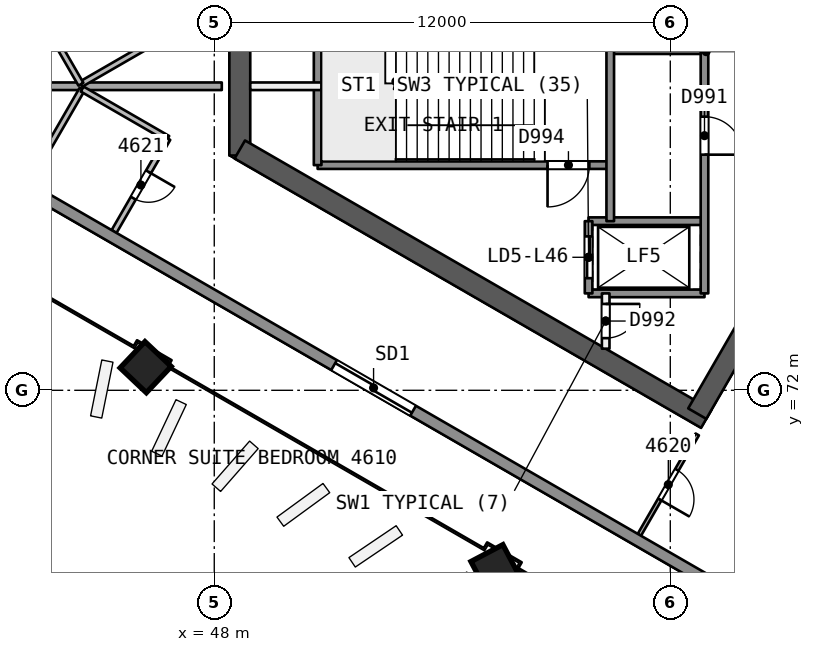
"""IFC4 building model, lengths in metres.
Left out: names, types, materials, properties, quantities, classifications, styles, units other than length and angle.
Written with IfcOpenShell. Run it as: python <this file> out.ifc"""

import sys

from ifc_helpers import new_model, si_unit, direction, frame, frame_2d, origin, origin_2d, place, context, subcontext, project, spatial, rectangle, extrude, element, fill, save


model = new_model("IFC4")
c1 = context("Model", 3, precision=1e-05, world=origin(), true_north=direction((0.0, 1.0)))
c2 = subcontext(c1, "Body", "Model", "MODEL_VIEW")
j1 = project(units=[si_unit("LENGTHUNIT", "METRE"), si_unit("PLANEANGLEUNIT", "RADIAN")], contexts=[c1])
p1 = place(None, origin())
s1 = spatial("IfcSite", under=j1, at=p1, CompositionType="ELEMENT")
p2 = place(p1, origin())
s2 = spatial("IfcBuilding", under=s1, at=p2, CompositionType="ELEMENT")
p3 = place(p2, frame((0.0, 0.0, 189.6)))
s3 = spatial("IfcBuildingStorey", under=s2, at=p3, CompositionType="ELEMENT", Elevation=189.6)
p4 = place(p3, frame((65.682, 80.0, 0.0), z_axis=(0.0, 0.0, 1.0), x_axis=(-0.500000202252, 0.866025287014, 0.0)))
e1 = element("IfcWall", 1, at=p4, inside=s3, PredefinedType="SHEAR", context=c2, shape_type="SweptSolid", body=[
    extrude(rectangle(XDim=10.221, YDim=0.55, at=frame_2d((5.111, 0.0))), origin(), (0.0, 0.0, 1.0), 3.7),
])
p5 = place(p4, frame((0.791, 0.0, 0.0)))
e2 = element("IfcOpeningElement", 2, at=p5, cuts=e1, PredefinedType="OPENING", context=c2, shape_type="SweptSolid", body=[
    extrude(rectangle(XDim=1.2, YDim=2.1, at=frame_2d((0.6, 1.05))), frame((0.0, 0.286, 0.0), z_axis=(0.0, -1.0, 0.0), x_axis=(1.0, 0.0, 0.0)), (0.0, 0.0, 1.0), 0.571),
])
p6 = place(p3, frame((48.672, 81.664, 0.0), z_axis=(0.0, 0.0, 1.0), x_axis=(0.0, -1.0, 0.0)))
e3 = element("IfcWall", 3, at=p6, inside=s3, PredefinedType="SHEAR", context=c2, shape_type="SweptSolid", body=[
    extrude(rectangle(XDim=3.487, YDim=0.55, at=frame_2d((1.743, 0.0))), origin(), (0.0, 0.0, 1.0), 3.7),
])
p7 = place(p3, frame((48.672, 78.336, 0.0), z_axis=(0.0, 0.0, 1.0), x_axis=(0.866023530946, -0.500003243837, 0.0)))
e4 = element("IfcWall", 4, at=p7, inside=s3, PredefinedType="SHEAR", context=c2, shape_type="SweptSolid", body=[
    extrude(rectangle(XDim=14.175, YDim=0.55, at=frame_2d((7.087, 0.0))), origin(), (0.0, 0.0, 1.0), 3.7),
])
p8 = place(p3, frame((60.709, 71.386, 0.0), z_axis=(0.0, 0.0, 1.0), x_axis=(0.500015938302, 0.866016201606, 0.0)))
e5 = element("IfcWall", 5, at=p8, inside=s3, PredefinedType="SHEAR", context=c2, shape_type="SweptSolid", body=[
    extrude(rectangle(XDim=10.105, YDim=0.55, at=frame_2d((5.053, 0.0))), origin(), (0.0, 0.0, 1.0), 3.7),
])
p9 = place(p8, frame((7.955, 0.0, 0.0)))
e6 = element("IfcOpeningElement", 6, at=p9, cuts=e5, PredefinedType="OPENING", context=c2, shape_type="SweptSolid", body=[
    extrude(rectangle(XDim=1.2, YDim=2.1, at=frame_2d((0.6, 1.05))), frame((0.0, 0.286, 0.0), z_axis=(0.0, -1.0, 0.0), x_axis=(1.0, 0.0, 0.0)), (0.0, 0.0, 1.0), 0.571),
])
p10 = place(p3, frame((46.161, 72.601, 0.0), z_axis=(0.02855911485, 0.006793507689, 0.999569019734), x_axis=(-0.865318766308, 0.500768301983, 0.021319953197)))
e7 = element("IfcColumn", 7, at=p10, inside=s3, PredefinedType="COLUMN", context=c2, shape_type="SweptSolid", body=[
    extrude(rectangle(XDim=0.95, YDim=0.95, at=origin_2d()), origin(), (0.0, 0.0, 1.0), 3.702),
])
p11 = place(p3, frame((55.373, 67.281, 0.0), z_axis=(0.019328516974, 0.012138044789, 0.999739504221), x_axis=(-0.865690909737, 0.500465383244, 0.010660627254)))
e8 = element("IfcColumn", 8, at=p11, inside=s3, PredefinedType="COLUMN", context=c2, shape_type="SweptSolid", body=[
    extrude(rectangle(XDim=0.95, YDim=0.95, at=origin_2d()), origin(), (0.0, 0.0, 1.0), 3.701),
])
p12 = place(p3, frame((46.743, 81.354, 0.0), z_axis=(0.0, 0.0, 1.0), x_axis=(-0.866021400173, -0.500006934395, 0.0)))
e9 = element("IfcWall", 9, at=p12, inside=s3, PredefinedType="PARTITIONING", context=c2, shape_type="SweptSolid", body=[
    extrude(rectangle(XDim=2.6, YDim=0.15, at=frame_2d((1.3, 0.0))), origin(), (0.0, 0.0, 1.0), 3.25),
])
p13 = place(p3, frame((44.491, 80.054, 0.0), z_axis=(0.0, 0.0, 1.0), x_axis=(-0.500043204492, 0.866000458222, 0.0)))
e10 = element("IfcWall", 10, at=p13, inside=s3, PredefinedType="PARTITIONING", context=c2, shape_type="SweptSolid", body=[
    extrude(rectangle(XDim=2.482, YDim=0.15, at=frame_2d((1.241, 0.0))), origin(), (0.0, 0.0, 1.0), 3.25),
])
p14 = place(p3, frame((43.25, 80.0, 0.0), z_axis=(0.0, 0.0, 1.0), x_axis=(1.0, 0.0, 0.0)))
e11 = element("IfcWall", 11, at=p14, inside=s3, PredefinedType="PARTITIONING", context=c2, shape_type="SweptSolid", body=[
    extrude(rectangle(XDim=4.948, YDim=0.2, at=frame_2d((2.474, 0.0))), origin(), (0.0, 0.0, 1.0), 3.25),
])
p15 = place(p3, frame((60.71, 70.838, 0.0), z_axis=(0.0, 0.0, 1.0), x_axis=(-0.499978833458, -0.866037623948, 0.0)))
e12 = element("IfcWall", 12, at=p15, inside=s3, PredefinedType="PARTITIONING", context=c2, shape_type="SweptSolid", body=[
    extrude(rectangle(XDim=3.05, YDim=0.1, at=frame_2d((1.525, 0.0))), origin(), (0.0, 0.0, 1.0), 3.25),
])
p16 = place(p15, frame((1.075, 0.0, 0.0)))
e13 = element("IfcOpeningElement", 13, at=p16, cuts=e12, PredefinedType="OPENING", context=c2, shape_type="SweptSolid", body=[
    extrude(rectangle(XDim=0.9, YDim=2.1, at=frame_2d((0.45, 1.05))), frame((0.0, 0.061, 0.0), z_axis=(0.0, -1.0, 0.0), x_axis=(1.0, 0.0, 0.0)), (0.0, 0.0, 1.0), 0.121),
])
p17 = place(p3, frame((43.25, 77.718, 0.0), z_axis=(0.0, 0.0, 1.0), x_axis=(0.499990435942, 0.866030925526, 0.0)))
e14 = element("IfcWall", 14, at=p17, inside=s3, PredefinedType="PARTITIONING", context=c2, shape_type="SweptSolid", body=[
    extrude(rectangle(XDim=2.55, YDim=0.15, at=frame_2d((1.275, 0.0))), origin(), (0.0, 0.0, 1.0), 3.25),
])
p18 = place(p3, frame((44.525, 79.926, 0.0), z_axis=(0.0, 0.0, 1.0), x_axis=(0.866021400173, -0.500006934395, 0.0)))
e15 = element("IfcWall", 15, at=p18, inside=s3, PredefinedType="PARTITIONING", context=c2, shape_type="SweptSolid", body=[
    extrude(rectangle(XDim=2.6, YDim=0.15, at=frame_2d((1.3, 0.0))), origin(), (0.0, 0.0, 1.0), 3.25),
])
p19 = place(p3, frame((46.777, 78.626, 0.0), z_axis=(0.0, 0.0, 1.0), x_axis=(-0.499984077514, -0.866034596441, 0.0)))
e16 = element("IfcWall", 16, at=p19, inside=s3, PredefinedType="PARTITIONING", context=c2, shape_type="SweptSolid", body=[
    extrude(rectangle(XDim=2.827, YDim=0.15, at=frame_2d((1.414, 0.0))), origin(), (0.0, 0.0, 1.0), 3.25),
])
p20 = place(p19, frame((1.014, 0.0, 0.0)))
e17 = element("IfcOpeningElement", 17, at=p20, cuts=e16, PredefinedType="OPENING", context=c2, shape_type="SweptSolid", body=[
    extrude(rectangle(XDim=0.8, YDim=2.1, at=frame_2d((0.4, 1.05))), frame((0.0, 0.085, 0.0), z_axis=(0.0, -1.0, 0.0), x_axis=(1.0, 0.0, 0.0)), (0.0, 0.0, 1.0), 0.171),
])
p21 = place(p3, frame((88.621, 51.031, 0.0), z_axis=(0.0, 0.0, 1.0), x_axis=(-0.866025007541, 0.500000686313, 0.0)))
e18 = element("IfcWall", 18, at=p21, inside=s3, PredefinedType="SOLIDWALL", context=c2, shape_type="SweptSolid", body=[
    extrude(rectangle(XDim=52.562, YDim=0.3, at=frame_2d((26.281, 0.0))), origin(), (0.0, 0.0, 1.0), 3.25),
])
p22 = place(p21, frame((29.367, 0.0, 0.0)))
e19 = element("IfcOpeningElement", 19, at=p22, cuts=e18, PredefinedType="OPENING", context=c2, shape_type="SweptSolid", body=[
    extrude(rectangle(XDim=2.4, YDim=2.4, at=frame_2d((1.2, 1.2))), frame((0.0, 0.161, 0.0), z_axis=(0.0, -1.0, 0.0), x_axis=(1.0, 0.0, 0.0)), (0.0, 0.0, 1.0), 0.321),
])
p23 = place(p21, frame((40.864, 0.0, 0.0)))
e20 = element("IfcOpeningElement", 20, at=p23, cuts=e18, PredefinedType="OPENING", context=c2, shape_type="SweptSolid", body=[
    extrude(rectangle(XDim=2.4, YDim=2.4, at=frame_2d((1.2, 1.2))), frame((0.0, 0.161, 0.0), z_axis=(0.0, -1.0, 0.0), x_axis=(1.0, 0.0, 0.0)), (0.0, 0.0, 1.0), 0.321),
])
p24 = place(p21, frame((19.625, 0.0, 0.0)))
e21 = element("IfcOpeningElement", 21, at=p24, cuts=e18, PredefinedType="OPENING", context=c2, shape_type="SweptSolid", body=[
    extrude(rectangle(XDim=2.4, YDim=2.4, at=frame_2d((1.2, 1.2))), frame((0.0, 0.161, 0.0), z_axis=(0.0, -1.0, 0.0), x_axis=(1.0, 0.0, 0.0)), (0.0, 0.0, 1.0), 0.321),
])
p25 = place(p21, frame((9.277, 0.0, 0.0)))
e22 = element("IfcOpeningElement", 22, at=p25, cuts=e18, PredefinedType="OPENING", context=c2, shape_type="SweptSolid", body=[
    extrude(rectangle(XDim=2.4, YDim=2.4, at=frame_2d((1.2, 1.2))), frame((0.0, 0.161, 0.0), z_axis=(0.0, -1.0, 0.0), x_axis=(1.0, 0.0, 0.0)), (0.0, 0.0, 1.0), 0.321),
])
p26 = place(p21, frame((24.212, 0.0, 0.9)))
e23 = element("IfcOpeningElement", 23, at=p26, cuts=e18, PredefinedType="OPENING", context=c2, shape_type="SweptSolid", body=[
    extrude(rectangle(XDim=1.8, YDim=1.5, at=frame_2d((0.9, 0.75))), frame((0.0, 0.161, 0.0), z_axis=(0.0, -1.0, 0.0), x_axis=(1.0, 0.0, 0.0)), (0.0, 0.0, 1.0), 0.321),
])
p27 = place(p3, frame((60.9, 80.95, 0.0), z_axis=(0.0, 0.0, 1.0), x_axis=(-1.0, 0.0, 0.0)))
e24 = element("IfcWall", 24, at=p27, inside=s3, PredefinedType="SOLIDWALL", context=c2, shape_type="SweptSolid", body=[
    extrude(rectangle(XDim=2.48, YDim=0.2, at=frame_2d((1.24, 0.0))), origin(), (0.0, 0.0, 1.0), 3.25),
])
p28 = place(p3, frame((50.82, 80.0, 0.0), z_axis=(0.0, 0.0, 1.0), x_axis=(-1.0, 0.0, 0.0)))
e25 = element("IfcWall", 25, at=p28, inside=s3, PredefinedType="PARTITIONING", context=c2, shape_type="SweptSolid", body=[
    extrude(rectangle(XDim=1.873, YDim=0.2, at=frame_2d((0.937, 0.0))), origin(), (0.0, 0.0, 1.0), 3.25),
])
p29 = place(p3, frame((58.42, 77.925, 0.0), z_axis=(0.0, 0.0, 1.0), x_axis=(-1.0, 0.0, 0.0)))
e26 = element("IfcWall", 26, at=p29, inside=s3, PredefinedType="SOLIDWALL", context=c2, shape_type="SweptSolid", body=[
    extrude(rectangle(XDim=7.7, YDim=0.2, at=frame_2d((3.85, 0.0))), origin(), (0.0, 0.0, 1.0), 3.25),
])
p30 = place(p29, frame((0.55, 0.0, 0.0)))
e27 = element("IfcOpeningElement", 27, at=p30, cuts=e26, PredefinedType="OPENING", context=c2, shape_type="SweptSolid", body=[
    extrude(rectangle(XDim=1.1, YDim=2.1, at=frame_2d((0.55, 1.05))), frame((0.0, 0.11, 0.0), z_axis=(0.0, -1.0, 0.0), x_axis=(1.0, 0.0, 0.0)), (0.0, 0.0, 1.0), 0.221),
])
for number, where, z_axis, x_axis in (
    (28, (60.9, 76.45, 0.0), (0.0, 0.0, 1.0), (-1.0, 0.0, 0.0)),
    (29, (60.9, 74.55, 0.0), (0.0, 0.0, 1.0), (-1.0, 0.0, 0.0)),
):
    element("IfcWall", number, at=place(p3, frame(where, z_axis=z_axis, x_axis=x_axis)), inside=s3, PredefinedType="SOLIDWALL", context=c2, shape_type="SweptSolid", body=[
        extrude(rectangle(XDim=3.05, YDim=0.2, at=frame_2d((1.525, 0.0))), origin(), (0.0, 0.0, 1.0), 3.25),
    ])
p31 = place(p3, frame((60.9, 85.45, 0.0), z_axis=(0.0, 0.0, 1.0), x_axis=(0.0, -1.0, 0.0)))
e30 = element("IfcWall", 30, at=p31, inside=s3, PredefinedType="SOLIDWALL", context=c2, shape_type="SweptSolid", body=[
    extrude(rectangle(XDim=10.9, YDim=0.2, at=frame_2d((5.45, 0.0))), origin(), (0.0, 0.0, 1.0), 3.25),
])
p32 = place(p31, frame((1.75, 0.0, 0.0)))
e31 = element("IfcOpeningElement", 31, at=p32, cuts=e30, PredefinedType="OPENING", context=c2, shape_type="SweptSolid", body=[
    extrude(rectangle(XDim=1.0, YDim=2.1, at=frame_2d((0.5, 1.05))), frame((0.0, 0.11, 0.0), z_axis=(0.0, -1.0, 0.0), x_axis=(1.0, 0.0, 0.0)), (0.0, 0.0, 1.0), 0.221),
])
p33 = place(p31, frame((6.25, 0.0, 0.0)))
e32 = element("IfcOpeningElement", 32, at=p33, cuts=e30, PredefinedType="OPENING", context=c2, shape_type="SweptSolid", body=[
    extrude(rectangle(XDim=1.0, YDim=2.1, at=frame_2d((0.5, 1.05))), frame((0.0, 0.11, 0.0), z_axis=(0.0, -1.0, 0.0), x_axis=(1.0, 0.0, 0.0)), (0.0, 0.0, 1.0), 0.221),
])
p34 = place(p3, frame((58.42, 86.974, 0.0), z_axis=(0.0, 0.0, 1.0), x_axis=(0.0, -1.0, 0.0)))
e33 = element("IfcWall", 33, at=p34, inside=s3, PredefinedType="SOLIDWALL", context=c2, shape_type="SweptSolid", body=[
    extrude(rectangle(XDim=10.524, YDim=0.2, at=frame_2d((5.262, 0.0))), origin(), (0.0, 0.0, 1.0), 3.25),
])
p35 = place(p34, frame((0.312, 0.0, 0.0)))
e34 = element("IfcOpeningElement", 34, at=p35, cuts=e33, PredefinedType="OPENING", context=c2, shape_type="SweptSolid", body=[
    extrude(rectangle(XDim=0.9, YDim=2.1, at=frame_2d((0.45, 1.05))), frame((0.0, 0.11, 0.0), z_axis=(0.0, -1.0, 0.0), x_axis=(1.0, 0.0, 0.0)), (0.0, 0.0, 1.0), 0.221),
])
p36 = place(p3, frame((58.3, 74.55, 0.0), z_axis=(0.0, 0.0, 1.0), x_axis=(0.0, -1.0, 0.0)))
e35 = element("IfcWall", 35, at=p36, inside=s3, PredefinedType="PARTITIONING", context=c2, shape_type="SweptSolid", body=[
    extrude(rectangle(XDim=1.455, YDim=0.2, at=frame_2d((0.728, 0.0))), origin(), (0.0, 0.0, 1.0), 3.25),
])
p37 = place(p36, frame((0.278, 0.0, 0.0)))
e36 = element("IfcOpeningElement", 36, at=p37, cuts=e35, PredefinedType="OPENING", context=c2, shape_type="SweptSolid", body=[
    extrude(rectangle(XDim=0.9, YDim=2.1, at=frame_2d((0.45, 1.05))), frame((0.0, 0.11, 0.0), z_axis=(0.0, -1.0, 0.0), x_axis=(1.0, 0.0, 0.0)), (0.0, 0.0, 1.0), 0.221),
])
p38 = place(p3, frame((57.85, 76.45, 0.0), z_axis=(0.0, 0.0, 1.0), x_axis=(0.0, -1.0, 0.0)))
e37 = element("IfcWall", 37, at=p38, inside=s3, PredefinedType="SOLIDWALL", context=c2, shape_type="SweptSolid", body=[
    extrude(rectangle(XDim=1.9, YDim=0.2, at=frame_2d((0.95, 0.0))), origin(), (0.0, 0.0, 1.0), 3.25),
])
p39 = place(p38, frame((0.4, 0.0, 0.0)))
e38 = element("IfcOpeningElement", 38, at=p39, cuts=e37, PredefinedType="OPENING", context=c2, shape_type="SweptSolid", body=[
    extrude(rectangle(XDim=1.1, YDim=2.1, at=frame_2d((0.55, 1.05))), frame((0.0, 0.11, 0.0), z_axis=(0.0, -1.0, 0.0), x_axis=(1.0, 0.0, 0.0)), (0.0, 0.0, 1.0), 0.221),
])
p40 = place(p3, frame((50.72, 82.075, 0.0), z_axis=(0.0, 0.0, 1.0), x_axis=(0.0, -1.0, 0.0)))
e39 = element("IfcWall", 39, at=p40, inside=s3, PredefinedType="SOLIDWALL", context=c2, shape_type="SweptSolid", body=[
    extrude(rectangle(XDim=4.15, YDim=0.2, at=frame_2d((2.075, 0.0))), origin(), (0.0, 0.0, 1.0), 3.25),
])
p41 = place(p16, origin())
e40 = element("IfcDoor", 40, at=p41, inside=s3, OperationType="SINGLE_SWING_RIGHT", PredefinedType="NOTDEFINED", context=c2, shape_type="SweptSolid", body=[
    extrude(rectangle(XDim=0.9, YDim=2.1, at=frame_2d((0.45, 1.05))), frame((0.0, 0.025, 0.0), z_axis=(0.0, -1.0, 0.0), x_axis=(1.0, 0.0, 0.0)), (0.0, 0.0, 1.0), 0.05),
])
fill(e13, e40)
p42 = place(p20, origin())
e41 = element("IfcDoor", 41, at=p42, inside=s3, OperationType="SINGLE_SWING_LEFT", PredefinedType="NOTDEFINED", context=c2, shape_type="SweptSolid", body=[
    extrude(rectangle(XDim=0.8, YDim=2.1, at=frame_2d((0.4, 1.05))), frame((0.0, 0.025, 0.0), z_axis=(0.0, -1.0, 0.0), x_axis=(1.0, 0.0, 0.0)), (0.0, 0.0, 1.0), 0.05),
])
fill(e17, e41)
p43 = place(p23, origin())
e42 = element("IfcDoor", 42, at=p43, inside=s3, OperationType="SLIDING_TO_RIGHT", PredefinedType="NOTDEFINED", context=c2, shape_type="SweptSolid", body=[
    extrude(rectangle(XDim=2.4, YDim=2.4, at=frame_2d((1.2, 1.2))), frame((0.0, 0.025, 0.0), z_axis=(0.0, -1.0, 0.0), x_axis=(1.0, 0.0, 0.0)), (0.0, 0.0, 1.0), 0.05),
])
fill(e20, e42)
p44 = place(p39, origin())
e43 = element("IfcDoor", 43, at=p44, inside=s3, OperationType="SLIDING_TO_RIGHT", PredefinedType="NOTDEFINED", context=c2, shape_type="SweptSolid", body=[
    extrude(rectangle(XDim=1.1, YDim=2.1, at=frame_2d((0.55, 1.05))), frame((0.0, 0.025, 0.0), z_axis=(0.0, -1.0, 0.0), x_axis=(1.0, 0.0, 0.0)), (0.0, 0.0, 1.0), 0.05),
])
fill(e38, e43)
p45 = place(p33, origin())
e44 = element("IfcDoor", 44, at=p45, inside=s3, OperationType="SINGLE_SWING_RIGHT", PredefinedType="NOTDEFINED", context=c2, shape_type="SweptSolid", body=[
    extrude(rectangle(XDim=1.0, YDim=2.1, at=frame_2d((0.5, 1.05))), frame((0.0, 0.025, 0.0), z_axis=(0.0, -1.0, 0.0), x_axis=(1.0, 0.0, 0.0)), (0.0, 0.0, 1.0), 0.05),
])
fill(e32, e44)
p46 = place(p37, origin())
e45 = element("IfcDoor", 45, at=p46, inside=s3, OperationType="SINGLE_SWING_LEFT", PredefinedType="NOTDEFINED", context=c2, shape_type="SweptSolid", body=[
    extrude(rectangle(XDim=0.9, YDim=2.1, at=frame_2d((0.45, 1.05))), frame((0.0, 0.025, 0.0), z_axis=(0.0, -1.0, 0.0), x_axis=(1.0, 0.0, 0.0)), (0.0, 0.0, 1.0), 0.05),
])
fill(e36, e45)
p47 = place(p30, origin())
e46 = element("IfcDoor", 46, at=p47, inside=s3, OperationType="SINGLE_SWING_RIGHT", PredefinedType="NOTDEFINED", context=c2, shape_type="SweptSolid", body=[
    extrude(rectangle(XDim=1.1, YDim=2.1, at=frame_2d((0.55, 1.05))), frame((0.0, 0.025, 0.0), z_axis=(0.0, -1.0, 0.0), x_axis=(1.0, 0.0, 0.0)), (0.0, 0.0, 1.0), 0.05),
])
fill(e27, e46)
save(model, sys.argv[1])
